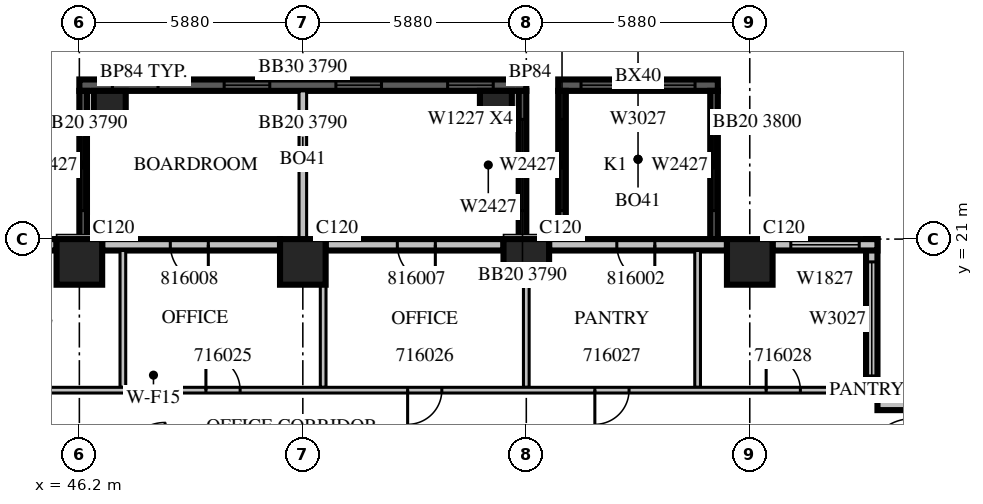
"""IFC4 building model, lengths in metres.
Left out: names, types, materials, properties, quantities, classifications, styles, units other than length and angle.
Written with IfcOpenShell. Run it as: python <this file> out.ifc"""

import sys

from ifc_helpers import new_model, si_unit, direction, frame, frame_2d, origin, origin_2d, place, context, subcontext, project, spatial, rectangle, extrude, source, transform, mapped, element, fill, save


model = new_model("IFC4")
c1 = context("Model", 3, precision=1e-05, world=origin(), true_north=direction((0.0, 1.0)))
c2 = subcontext(c1, "Body", "Model", "MODEL_VIEW")
j1 = project(units=[si_unit("LENGTHUNIT", "METRE"), si_unit("PLANEANGLEUNIT", "RADIAN")], contexts=[c1])
p1 = place(None, origin())
s1 = spatial("IfcSite", under=j1, at=p1, CompositionType="ELEMENT")
p2 = place(p1, origin())
s2 = spatial("IfcBuilding", under=s1, at=p2, CompositionType="ELEMENT")
p3 = place(p2, frame((0.0, 0.0, 78.3)))
s3 = spatial("IfcBuildingStorey", under=s2, at=p3, CompositionType="ELEMENT", Elevation=78.3)
m1 = source(origin(), c2, "Body", "SweptSolid", [
    extrude(rectangle(XDim=1.2, YDim=1.2, at=origin_2d()), origin(), (0.0, 0.0, 1.0), 4.2),
])
for number, where, z_axis, x_axis in (
    (1, (46.2, 20.4, 0.0), (0.0, 0.0, 1.0), (1.0, 0.0, 0.0)),
    (2, (52.08, 20.4, 0.0), (0.0, 0.0, 1.0), (1.0, 0.0, 0.0)),
    (3, (57.96, 20.4, 0.0), (0.0, 0.0, 1.0), (1.0, 0.0, 0.0)),
    (4, (63.84, 20.4, 0.0), (0.0, 0.0, 1.0), (1.0, 0.0, 0.0)),
):
    element("IfcColumn", number, at=place(p3, frame(where, z_axis=z_axis, x_axis=x_axis)), inside=s3, PredefinedType="COLUMN", context=c2, shape_type="MappedRepresentation", body=[
        mapped(m1, transform((0.0, 0.0, 0.0), scale=1.0)),
    ])
m2 = source(origin(), c2, "Body", "SweptSolid", [
    extrude(rectangle(XDim=0.84, YDim=0.84, at=origin_2d()), origin(), (0.0, 0.0, 1.0), 4.2),
])
for number, where, z_axis, x_axis in (
    (5, (47.0, 24.48, 0.0), (0.0, 0.0, 1.0), (1.0, 0.0, 0.0)),
    (6, (57.16, 24.48, 0.0), (0.0, 0.0, 1.0), (1.0, 0.0, 0.0)),
):
    element("IfcColumn", number, at=place(p3, frame(where, z_axis=z_axis, x_axis=x_axis)), inside=s3, PredefinedType="COLUMN", context=c2, shape_type="MappedRepresentation", body=[
        mapped(m2, transform((0.0, 0.0, 0.0), scale=1.0)),
    ])
m3 = source(origin(), c2, "Body", "SweptSolid", [
    extrude(rectangle(XDim=11.76, YDim=0.3, at=frame_2d((5.88, 0.0))), origin(), (0.0, 0.0, 1.0), 3.79),
])
p4 = place(p3, frame((57.96, 25.05, 0.0), z_axis=(0.0, 0.0, 1.0), x_axis=(-1.0, 0.0, 0.0)))
e7 = element("IfcWall", 7, at=p4, inside=s3, PredefinedType="SOLIDWALL", context=c2, shape_type="MappedRepresentation", body=[
    mapped(m3, transform((0.0, 0.0, 0.0), scale=1.0)),
])
m4 = source(origin(), c2, "Body", "SweptSolid", [
    extrude(rectangle(XDim=1.2, YDim=2.7, at=frame_2d((0.6, 1.35))), frame((0.0, 0.16, 0.0), z_axis=(0.0, -1.0, 0.0), x_axis=(1.0, 0.0, 0.0)), (0.0, 0.0, 1.0), 0.32),
])
p5 = place(p4, frame((0.87, 0.0, 0.6)))
e8 = element("IfcOpeningElement", 8, at=p5, cuts=e7, PredefinedType="OPENING", context=c2, shape_type="MappedRepresentation", body=[
    mapped(m4, transform((0.0, 0.0, 0.0), scale=1.0)),
])
p6 = place(p4, frame((3.81, 0.0, 0.6)))
e9 = element("IfcOpeningElement", 9, at=p6, cuts=e7, PredefinedType="OPENING", context=c2, shape_type="MappedRepresentation", body=[
    mapped(m4, transform((0.0, 0.0, 0.0), scale=1.0)),
])
p7 = place(p4, frame((6.75, 0.0, 0.6)))
e10 = element("IfcOpeningElement", 10, at=p7, cuts=e7, PredefinedType="OPENING", context=c2, shape_type="MappedRepresentation", body=[
    mapped(m4, transform((0.0, 0.0, 0.0), scale=1.0)),
])
p8 = place(p4, frame((9.69, 0.0, 0.6)))
e11 = element("IfcOpeningElement", 11, at=p8, cuts=e7, PredefinedType="OPENING", context=c2, shape_type="MappedRepresentation", body=[
    mapped(m4, transform((0.0, 0.0, 0.0), scale=1.0)),
])
m5 = source(origin(), c2, "Body", "SweptSolid", [
    extrude(rectangle(XDim=3.9, YDim=0.2, at=frame_2d((1.95, 0.0))), origin(), (0.0, 0.0, 1.0), 3.79),
])
p9 = place(p3, frame((52.08, 21.0, 0.0), z_axis=(0.0, 0.0, 1.0), x_axis=(0.0, 1.0, 0.0)))
e12 = element("IfcWall", 12, at=p9, inside=s3, PredefinedType="SOLIDWALL", context=c2, shape_type="MappedRepresentation", body=[
    mapped(m5, transform((0.0, 0.0, 0.0), scale=1.0)),
])
m6 = source(origin(), c2, "Body", "SweptSolid", [
    extrude(rectangle(XDim=3.9, YDim=0.2, at=frame_2d((1.95, 0.0))), origin(), (0.0, 0.0, 1.0), 3.79),
])
p10 = place(p3, frame((57.86, 21.0, 0.0), z_axis=(0.0, 0.0, 1.0), x_axis=(0.0, 1.0, 0.0)))
e13 = element("IfcWall", 13, at=p10, inside=s3, PredefinedType="SOLIDWALL", context=c2, shape_type="MappedRepresentation", body=[
    mapped(m6, transform((0.0, 0.0, 0.0), scale=1.0)),
])
m7 = source(origin(), c2, "Body", "SweptSolid", [
    extrude(rectangle(XDim=2.4, YDim=2.7, at=frame_2d((1.2, 1.35))), frame((0.0, 0.11, 0.0), z_axis=(0.0, -1.0, 0.0), x_axis=(1.0, 0.0, 0.0)), (0.0, 0.0, 1.0), 0.22),
])
p11 = place(p10, frame((0.75, 0.0, 0.6)))
e14 = element("IfcOpeningElement", 14, at=p11, cuts=e13, PredefinedType="OPENING", context=c2, shape_type="MappedRepresentation", body=[
    mapped(m7, transform((0.0, 0.0, 0.0), scale=1.0)),
])
p12 = place(p3, frame((46.3, 21.0, 0.0), z_axis=(0.0, 0.0, 1.0), x_axis=(0.0, 1.0, 0.0)))
e15 = element("IfcWall", 15, at=p12, inside=s3, PredefinedType="SOLIDWALL", context=c2, shape_type="MappedRepresentation", body=[
    mapped(m6, transform((0.0, 0.0, 0.0), scale=1.0)),
])
p13 = place(p12, frame((0.75, 0.0, 0.6)))
e16 = element("IfcOpeningElement", 16, at=p13, cuts=e15, PredefinedType="OPENING", context=c2, shape_type="MappedRepresentation", body=[
    mapped(m7, transform((0.0, 0.0, 0.0), scale=1.0)),
])
m8 = source(origin(), c2, "Body", "SweptSolid", [
    extrude(rectangle(XDim=4.2, YDim=0.3, at=frame_2d((2.1, 0.0))), origin(), (0.0, 0.0, 1.0), 3.8),
])
p14 = place(p3, frame((63.0, 25.05, 0.0), z_axis=(0.0, 0.0, 1.0), x_axis=(-1.0, 0.0, 0.0)))
e17 = element("IfcWall", 17, at=p14, inside=s3, PredefinedType="SOLIDWALL", context=c2, shape_type="MappedRepresentation", body=[
    mapped(m8, transform((0.0, 0.0, 0.0), scale=1.0)),
])
m9 = source(origin(), c2, "Body", "SweptSolid", [
    extrude(rectangle(XDim=3.0, YDim=2.7, at=frame_2d((1.5, 1.35))), frame((0.0, 0.16, 0.0), z_axis=(0.0, -1.0, 0.0), x_axis=(1.0, 0.0, 0.0)), (0.0, 0.0, 1.0), 0.32),
])
p15 = place(p14, frame((0.6, 0.0, 0.6)))
e18 = element("IfcOpeningElement", 18, at=p15, cuts=e17, PredefinedType="OPENING", context=c2, shape_type="MappedRepresentation", body=[
    mapped(m9, transform((0.0, 0.0, 0.0), scale=1.0)),
])
m10 = source(origin(), c2, "Body", "SweptSolid", [
    extrude(rectangle(XDim=3.9, YDim=0.2, at=frame_2d((1.95, 0.0))), origin(), (0.0, 0.0, 1.0), 3.8),
])
p16 = place(p3, frame((62.9, 21.0, 0.0), z_axis=(0.0, 0.0, 1.0), x_axis=(0.0, 1.0, 0.0)))
e19 = element("IfcWall", 19, at=p16, inside=s3, PredefinedType="SOLIDWALL", context=c2, shape_type="MappedRepresentation", body=[
    mapped(m10, transform((0.0, 0.0, 0.0), scale=1.0)),
])
p17 = place(p16, frame((0.75, 0.0, 0.6)))
e20 = element("IfcOpeningElement", 20, at=p17, cuts=e19, PredefinedType="OPENING", context=c2, shape_type="MappedRepresentation", body=[
    mapped(m7, transform((0.0, 0.0, 0.0), scale=1.0)),
])
p18 = place(p3, frame((58.9, 21.0, 0.0), z_axis=(0.0, 0.0, 1.0), x_axis=(0.0, 1.0, 0.0)))
e21 = element("IfcWall", 21, at=p18, inside=s3, PredefinedType="SOLIDWALL", context=c2, shape_type="MappedRepresentation", body=[
    mapped(m10, transform((0.0, 0.0, 0.0), scale=1.0)),
])
p19 = place(p18, frame((0.75, 0.0, 0.6)))
e22 = element("IfcOpeningElement", 22, at=p19, cuts=e21, PredefinedType="OPENING", context=c2, shape_type="MappedRepresentation", body=[
    mapped(m7, transform((0.0, 0.0, 0.0), scale=1.0)),
])
m11 = source(origin(), c2, "Body", "SweptSolid", [
    extrude(rectangle(XDim=4.2, YDim=0.3, at=frame_2d((2.1, 0.0))), origin(), (0.0, 0.0, 1.0), 3.8),
])
p20 = place(p3, frame((71.4, 16.65, 0.0), z_axis=(0.0, 0.0, 1.0), x_axis=(-1.0, 0.0, 0.0)))
e23 = element("IfcWall", 23, at=p20, inside=s3, PredefinedType="STANDARD", context=c2, shape_type="MappedRepresentation", body=[
    mapped(m11, transform((0.0, 0.0, 0.0), scale=1.0)),
])
p21 = place(p20, frame((0.66, 0.0, 0.6)))
e24 = element("IfcOpeningElement", 24, at=p21, cuts=e23, PredefinedType="OPENING", context=c2, shape_type="MappedRepresentation", body=[
    mapped(m4, transform((0.0, 0.0, 0.0), scale=1.0)),
])
p22 = place(p3, frame((67.05, 16.8, 0.0), z_axis=(0.0, 0.0, 1.0), x_axis=(0.0, 1.0, 0.0)))
e25 = element("IfcWall", 25, at=p22, inside=s3, PredefinedType="STANDARD", context=c2, shape_type="MappedRepresentation", body=[
    mapped(m11, transform((0.0, 0.0, 0.0), scale=1.0)),
])
p23 = place(p22, frame((0.6, 0.0, 0.6)))
e26 = element("IfcOpeningElement", 26, at=p23, cuts=e25, PredefinedType="OPENING", context=c2, shape_type="MappedRepresentation", body=[
    mapped(m9, transform((0.0, 0.0, 0.0), scale=1.0)),
])
m12 = source(origin(), c2, "Body", "SweptSolid", [
    extrude(rectangle(XDim=2.76, YDim=0.3, at=frame_2d((1.38, 0.0))), origin(), (0.0, 0.0, 1.0), 3.8),
])
p24 = place(p3, frame((67.2, 20.85, 0.0), z_axis=(0.0, 0.0, 1.0), x_axis=(-1.0, 0.0, 0.0)))
e27 = element("IfcWall", 27, at=p24, inside=s3, PredefinedType="STANDARD", context=c2, shape_type="MappedRepresentation", body=[
    mapped(m12, transform((0.0, 0.0, 0.0), scale=1.0)),
])
m13 = source(origin(), c2, "Body", "SweptSolid", [
    extrude(rectangle(XDim=1.8, YDim=2.7, at=frame_2d((0.9, 1.35))), frame((0.0, 0.16, 0.0), z_axis=(0.0, -1.0, 0.0), x_axis=(1.0, 0.0, 0.0)), (0.0, 0.0, 1.0), 0.32),
])
p25 = place(p24, frame((0.48, 0.0, 0.6)))
e28 = element("IfcOpeningElement", 28, at=p25, cuts=e27, PredefinedType="OPENING", context=c2, shape_type="MappedRepresentation", body=[
    mapped(m13, transform((0.0, 0.0, 0.0), scale=1.0)),
])
m14 = source(origin(), c2, "Body", "SweptSolid", [
    extrude(rectangle(XDim=4.68, YDim=0.3, at=frame_2d((2.34, 0.0))), origin(), (0.0, 0.0, 1.0), 3.8),
])
p26 = place(p3, frame((63.24, 20.85, 0.0), z_axis=(0.0, 0.0, 1.0), x_axis=(-1.0, 0.0, 0.0)))
e29 = element("IfcWall", 29, at=p26, inside=s3, PredefinedType="STANDARD", context=c2, shape_type="MappedRepresentation", body=[
    mapped(m14, transform((0.0, 0.0, 0.0), scale=1.0)),
])
m15 = source(origin(), c2, "Body", "SweptSolid", [
    extrude(rectangle(XDim=1.0, YDim=2.1, at=frame_2d((0.5, 1.05))), frame((0.0, 0.16, 0.0), z_axis=(0.0, -1.0, 0.0), x_axis=(1.0, 0.0, 0.0)), (0.0, 0.0, 1.0), 0.32),
])
p27 = place(p26, frame((1.898, 0.0, 0.0)))
e30 = element("IfcOpeningElement", 30, at=p27, cuts=e29, PredefinedType="OPENING", context=c2, shape_type="MappedRepresentation", body=[
    mapped(m15, transform((0.0, 0.0, 0.0), scale=1.0)),
])
p28 = place(p3, frame((57.36, 20.85, 0.0), z_axis=(0.0, 0.0, 1.0), x_axis=(-1.0, 0.0, 0.0)))
e31 = element("IfcWall", 31, at=p28, inside=s3, PredefinedType="STANDARD", context=c2, shape_type="MappedRepresentation", body=[
    mapped(m14, transform((0.0, 0.0, 0.0), scale=1.0)),
])
p29 = place(p28, frame((1.793, 0.0, 0.0)))
e32 = element("IfcOpeningElement", 32, at=p29, cuts=e31, PredefinedType="OPENING", context=c2, shape_type="MappedRepresentation", body=[
    mapped(m15, transform((0.0, 0.0, 0.0), scale=1.0)),
])
p30 = place(p3, frame((51.48, 20.85, 0.0), z_axis=(0.0, 0.0, 1.0), x_axis=(-1.0, 0.0, 0.0)))
e33 = element("IfcWall", 33, at=p30, inside=s3, PredefinedType="STANDARD", context=c2, shape_type="MappedRepresentation", body=[
    mapped(m14, transform((0.0, 0.0, 0.0), scale=1.0)),
])
p31 = place(p30, frame((1.887, 0.0, 0.0)))
e34 = element("IfcOpeningElement", 34, at=p31, cuts=e33, PredefinedType="OPENING", context=c2, shape_type="MappedRepresentation", body=[
    mapped(m15, transform((0.0, 0.0, 0.0), scale=1.0)),
])
m16 = source(origin(), c2, "Body", "SweptSolid", [
    extrude(rectangle(XDim=7.2, YDim=0.3, at=frame_2d((3.6, 0.0))), origin(), (0.0, 0.0, 1.0), 3.8),
])
p32 = place(p3, frame((45.6, 20.85, 0.0), z_axis=(0.0, 0.0, 1.0), x_axis=(-1.0, 0.0, 0.0)))
e35 = element("IfcWall", 35, at=p32, inside=s3, PredefinedType="STANDARD", context=c2, shape_type="MappedRepresentation", body=[
    mapped(m16, transform((0.0, 0.0, 0.0), scale=1.0)),
])
m17 = source(origin(), c2, "Body", "SweptSolid", [
    extrude(rectangle(XDim=2.4, YDim=2.7, at=frame_2d((1.2, 1.35))), frame((0.0, 0.16, 0.0), z_axis=(0.0, -1.0, 0.0), x_axis=(1.0, 0.0, 0.0)), (0.0, 0.0, 1.0), 0.32),
])
p33 = place(p32, frame((0.3, 0.0, 0.6)))
e36 = element("IfcOpeningElement", 36, at=p33, cuts=e35, PredefinedType="OPENING", context=c2, shape_type="MappedRepresentation", body=[
    mapped(m17, transform((0.0, 0.0, 0.0), scale=1.0)),
])
p34 = place(p32, frame((4.062, 0.0, 0.6)))
e37 = element("IfcOpeningElement", 37, at=p34, cuts=e35, PredefinedType="OPENING", context=c2, shape_type="MappedRepresentation", body=[
    mapped(m13, transform((0.0, 0.0, 0.0), scale=1.0)),
])
m18 = source(origin(), c2, "Body", "SweptSolid", [
    extrude(rectangle(XDim=3.6, YDim=0.15, at=frame_2d((1.8, 0.0))), origin(), (0.0, 0.0, 1.0), 3.8),
])
p35 = place(p3, frame((47.345, 20.7, 0.0), z_axis=(0.0, 0.0, 1.0), x_axis=(0.0, -1.0, 0.0)))
e38 = element("IfcWall", 38, at=p35, inside=s3, PredefinedType="PARTITIONING", context=c2, shape_type="MappedRepresentation", body=[
    mapped(m18, transform((0.0, 0.0, 0.0), scale=1.0)),
])
m19 = source(origin(), c2, "Body", "SweptSolid", [
    extrude(rectangle(XDim=2.701, YDim=0.15, at=frame_2d((1.351, 0.0))), origin(), (0.0, 0.0, 1.0), 3.8),
])
p36 = place(p3, frame((52.615, 19.801, 0.0), z_axis=(0.0, 0.0, 1.0), x_axis=(0.0, -1.0, 0.0)))
e39 = element("IfcWall", 39, at=p36, inside=s3, PredefinedType="PARTITIONING", context=c2, shape_type="MappedRepresentation", body=[
    mapped(m19, transform((0.0, 0.0, 0.0), scale=1.0)),
])
p37 = place(p3, frame((62.468, 20.7, 0.0), z_axis=(0.0, 0.0, 1.0), x_axis=(0.0, -1.0, 0.0)))
e40 = element("IfcWall", 40, at=p37, inside=s3, PredefinedType="PARTITIONING", context=c2, shape_type="MappedRepresentation", body=[
    mapped(m18, transform((0.0, 0.0, 0.0), scale=1.0)),
])
p38 = place(p3, frame((57.96, 17.1, 0.0), z_axis=(0.0, 0.0, 1.0), x_axis=(0.0, 1.0, 0.0)))
e41 = element("IfcWall", 41, at=p38, inside=s3, PredefinedType="PARTITIONING", context=c2, shape_type="MappedRepresentation", body=[
    mapped(m19, transform((0.0, 0.0, 0.0), scale=1.0)),
])
m20 = source(origin(), c2, "Body", "SweptSolid", [
    extrude(rectangle(XDim=37.5, YDim=0.15, at=frame_2d((18.75, 0.0))), origin(), (0.0, 0.0, 1.0), 3.8),
])
p39 = place(p3, frame((29.4, 17.025, 0.0), z_axis=(0.0, 0.0, 1.0), x_axis=(1.0, 0.0, 0.0)))
e42 = element("IfcWall", 42, at=p39, inside=s3, PredefinedType="PARTITIONING", context=c2, shape_type="MappedRepresentation", body=[
    mapped(m20, transform((0.0, 0.0, 0.0), scale=1.0)),
])
m21 = source(origin(), c2, "Body", "SweptSolid", [
    extrude(rectangle(XDim=1.0, YDim=2.1, at=frame_2d((0.5, 1.05))), frame((0.0, 0.085, 0.0), z_axis=(0.0, -1.0, 0.0), x_axis=(1.0, 0.0, 0.0)), (0.0, 0.0, 1.0), 0.17),
])
p40 = place(p39, frame((1.357, 0.0, 0.0)))
e43 = element("IfcOpeningElement", 43, at=p40, cuts=e42, PredefinedType="OPENING", context=c2, shape_type="MappedRepresentation", body=[
    mapped(m21, transform((0.0, 0.0, 0.0), scale=1.0)),
])
p41 = place(p39, frame((4.669, 0.0, 0.0)))
e44 = element("IfcOpeningElement", 44, at=p41, cuts=e42, PredefinedType="OPENING", context=c2, shape_type="MappedRepresentation", body=[
    mapped(m21, transform((0.0, 0.0, 0.0), scale=1.0)),
])
p42 = place(p39, frame((7.012, 0.0, 0.0)))
e45 = element("IfcOpeningElement", 45, at=p42, cuts=e42, PredefinedType="OPENING", context=c2, shape_type="MappedRepresentation", body=[
    mapped(m21, transform((0.0, 0.0, 0.0), scale=1.0)),
])
p43 = place(p39, frame((10.0, 0.0, 0.0)))
e46 = element("IfcOpeningElement", 46, at=p43, cuts=e42, PredefinedType="OPENING", context=c2, shape_type="MappedRepresentation", body=[
    mapped(m21, transform((0.0, 0.0, 0.0), scale=1.0)),
])
m22 = source(origin(), c2, "Body", "SweptSolid", [
    extrude(rectangle(XDim=0.9, YDim=2.1, at=frame_2d((0.45, 1.05))), frame((0.0, 0.085, 0.0), z_axis=(0.0, -1.0, 0.0), x_axis=(1.0, 0.0, 0.0)), (0.0, 0.0, 1.0), 0.17),
])
p44 = place(p39, frame((14.822, 0.0, 0.0)))
e47 = element("IfcOpeningElement", 47, at=p44, cuts=e42, PredefinedType="OPENING", context=c2, shape_type="MappedRepresentation", body=[
    mapped(m22, transform((0.0, 0.0, 0.0), scale=1.0)),
])
p45 = place(p39, frame((20.13, 0.0, 0.0)))
e48 = element("IfcOpeningElement", 48, at=p45, cuts=e42, PredefinedType="OPENING", context=c2, shape_type="MappedRepresentation", body=[
    mapped(m22, transform((0.0, 0.0, 0.0), scale=1.0)),
])
p46 = place(p39, frame((25.438, 0.0, 0.0)))
e49 = element("IfcOpeningElement", 49, at=p46, cuts=e42, PredefinedType="OPENING", context=c2, shape_type="MappedRepresentation", body=[
    mapped(m22, transform((0.0, 0.0, 0.0), scale=1.0)),
])
p47 = place(p39, frame((30.364, 0.0, 0.0)))
e50 = element("IfcOpeningElement", 50, at=p47, cuts=e42, PredefinedType="OPENING", context=c2, shape_type="MappedRepresentation", body=[
    mapped(m22, transform((0.0, 0.0, 0.0), scale=1.0)),
])
p48 = place(p39, frame((34.871, 0.0, 0.0)))
e51 = element("IfcOpeningElement", 51, at=p48, cuts=e42, PredefinedType="OPENING", context=c2, shape_type="MappedRepresentation", body=[
    mapped(m22, transform((0.0, 0.0, 0.0), scale=1.0)),
])
m23 = source(origin(), c2, "Body", "SweptSolid", [
    extrude(rectangle(XDim=1.2, YDim=2.7, at=frame_2d((0.6, 1.35))), frame((0.0, 0.03, 0.0), z_axis=(0.0, -1.0, 0.0), x_axis=(1.0, 0.0, 0.0)), (0.0, 0.0, 1.0), 0.06),
])
p49 = place(p5, origin())
e52 = element("IfcWindow", 52, at=p49, inside=s3, PartitioningType="SINGLE_PANEL", PredefinedType="WINDOW", context=c2, shape_type="MappedRepresentation", body=[
    mapped(m23, transform((0.0, 0.0, 0.0), scale=1.0)),
])
fill(e8, e52)
p50 = place(p6, origin())
e53 = element("IfcWindow", 53, at=p50, inside=s3, PartitioningType="SINGLE_PANEL", PredefinedType="WINDOW", context=c2, shape_type="MappedRepresentation", body=[
    mapped(m23, transform((0.0, 0.0, 0.0), scale=1.0)),
])
fill(e9, e53)
p51 = place(p7, origin())
e54 = element("IfcWindow", 54, at=p51, inside=s3, PartitioningType="SINGLE_PANEL", PredefinedType="WINDOW", context=c2, shape_type="MappedRepresentation", body=[
    mapped(m23, transform((0.0, 0.0, 0.0), scale=1.0)),
])
fill(e10, e54)
p52 = place(p8, origin())
e55 = element("IfcWindow", 55, at=p52, inside=s3, PartitioningType="SINGLE_PANEL", PredefinedType="WINDOW", context=c2, shape_type="MappedRepresentation", body=[
    mapped(m23, transform((0.0, 0.0, 0.0), scale=1.0)),
])
fill(e11, e55)
m24 = source(origin(), c2, "Body", "SweptSolid", [
    extrude(rectangle(XDim=2.4, YDim=2.7, at=frame_2d((1.2, 1.35))), frame((0.0, 0.03, 0.0), z_axis=(0.0, -1.0, 0.0), x_axis=(1.0, 0.0, 0.0)), (0.0, 0.0, 1.0), 0.06),
])
p53 = place(p11, origin())
e56 = element("IfcWindow", 56, at=p53, inside=s3, PartitioningType="SINGLE_PANEL", PredefinedType="WINDOW", context=c2, shape_type="MappedRepresentation", body=[
    mapped(m24, transform((0.0, 0.0, 0.0), scale=1.0)),
])
fill(e14, e56)
p54 = place(p13, origin())
e57 = element("IfcWindow", 57, at=p54, inside=s3, PartitioningType="SINGLE_PANEL", PredefinedType="WINDOW", context=c2, shape_type="MappedRepresentation", body=[
    mapped(m24, transform((0.0, 0.0, 0.0), scale=1.0)),
])
fill(e16, e57)
m25 = source(origin(), c2, "Body", "SweptSolid", [
    extrude(rectangle(XDim=3.0, YDim=2.7, at=frame_2d((1.5, 1.35))), frame((0.0, 0.03, 0.0), z_axis=(0.0, -1.0, 0.0), x_axis=(1.0, 0.0, 0.0)), (0.0, 0.0, 1.0), 0.06),
])
p55 = place(p15, origin())
e58 = element("IfcWindow", 58, at=p55, inside=s3, PartitioningType="SINGLE_PANEL", PredefinedType="WINDOW", context=c2, shape_type="MappedRepresentation", body=[
    mapped(m25, transform((0.0, 0.0, 0.0), scale=1.0)),
])
fill(e18, e58)
p56 = place(p17, origin())
e59 = element("IfcWindow", 59, at=p56, inside=s3, PartitioningType="SINGLE_PANEL", PredefinedType="WINDOW", context=c2, shape_type="MappedRepresentation", body=[
    mapped(m24, transform((0.0, 0.0, 0.0), scale=1.0)),
])
fill(e20, e59)
p57 = place(p19, origin())
e60 = element("IfcWindow", 60, at=p57, inside=s3, PartitioningType="SINGLE_PANEL", PredefinedType="WINDOW", context=c2, shape_type="MappedRepresentation", body=[
    mapped(m24, transform((0.0, 0.0, 0.0), scale=1.0)),
])
fill(e22, e60)
p58 = place(p23, origin())
e61 = element("IfcWindow", 61, at=p58, inside=s3, PartitioningType="SINGLE_PANEL", PredefinedType="WINDOW", context=c2, shape_type="MappedRepresentation", body=[
    mapped(m25, transform((0.0, 0.0, 0.0), scale=1.0)),
])
fill(e26, e61)
m26 = source(origin(), c2, "Body", "SweptSolid", [
    extrude(rectangle(XDim=1.8, YDim=2.7, at=frame_2d((0.9, 1.35))), frame((0.0, 0.03, 0.0), z_axis=(0.0, -1.0, 0.0), x_axis=(1.0, 0.0, 0.0)), (0.0, 0.0, 1.0), 0.06),
])
p59 = place(p25, origin())
e62 = element("IfcWindow", 62, at=p59, inside=s3, PartitioningType="SINGLE_PANEL", PredefinedType="WINDOW", context=c2, shape_type="MappedRepresentation", body=[
    mapped(m26, transform((0.0, 0.0, 0.0), scale=1.0)),
])
fill(e28, e62)
m27 = source(origin(), c2, "Body", "SweptSolid", [
    extrude(rectangle(XDim=0.9, YDim=2.1, at=frame_2d((0.45, 1.05))), frame((0.0, 0.025, 0.0), z_axis=(0.0, -1.0, 0.0), x_axis=(1.0, 0.0, 0.0)), (0.0, 0.0, 1.0), 0.05),
])
p60 = place(p45, origin())
e63 = element("IfcDoor", 63, at=p60, inside=s3, OperationType="SINGLE_SWING_LEFT", PredefinedType="DOOR", context=c2, shape_type="MappedRepresentation", body=[
    mapped(m27, transform((0.0, 0.0, 0.0), scale=1.0)),
])
fill(e48, e63)
p61 = place(p46, origin())
e64 = element("IfcDoor", 64, at=p61, inside=s3, OperationType="SINGLE_SWING_RIGHT", PredefinedType="DOOR", context=c2, shape_type="MappedRepresentation", body=[
    mapped(m27, transform((0.0, 0.0, 0.0), scale=1.0)),
])
fill(e49, e64)
p62 = place(p47, origin())
e65 = element("IfcDoor", 65, at=p62, inside=s3, OperationType="SINGLE_SWING_RIGHT", PredefinedType="DOOR", context=c2, shape_type="MappedRepresentation", body=[
    mapped(m27, transform((0.0, 0.0, 0.0), scale=1.0)),
])
fill(e50, e65)
p63 = place(p48, origin())
e66 = element("IfcDoor", 66, at=p63, inside=s3, OperationType="SINGLE_SWING_LEFT", PredefinedType="DOOR", context=c2, shape_type="MappedRepresentation", body=[
    mapped(m27, transform((0.0, 0.0, 0.0), scale=1.0)),
])
fill(e51, e66)
m28 = source(origin(), c2, "Body", "SweptSolid", [
    extrude(rectangle(XDim=1.0, YDim=2.1, at=frame_2d((0.5, 1.05))), frame((0.0, 0.025, 0.0), z_axis=(0.0, -1.0, 0.0), x_axis=(1.0, 0.0, 0.0)), (0.0, 0.0, 1.0), 0.05),
])
p64 = place(p27, origin())
e67 = element("IfcDoor", 67, at=p64, inside=s3, OperationType="SINGLE_SWING_LEFT", PredefinedType="DOOR", context=c2, shape_type="MappedRepresentation", body=[
    mapped(m28, transform((0.0, 0.0, 0.0), scale=1.0)),
])
fill(e30, e67)
p65 = place(p29, origin())
e68 = element("IfcDoor", 68, at=p65, inside=s3, OperationType="SINGLE_SWING_LEFT", PredefinedType="DOOR", context=c2, shape_type="MappedRepresentation", body=[
    mapped(m28, transform((0.0, 0.0, 0.0), scale=1.0)),
])
fill(e32, e68)
p66 = place(p31, origin())
e69 = element("IfcDoor", 69, at=p66, inside=s3, OperationType="SINGLE_SWING_LEFT", PredefinedType="DOOR", context=c2, shape_type="MappedRepresentation", body=[
    mapped(m28, transform((0.0, 0.0, 0.0), scale=1.0)),
])
fill(e34, e69)
save(model, sys.argv[1])
